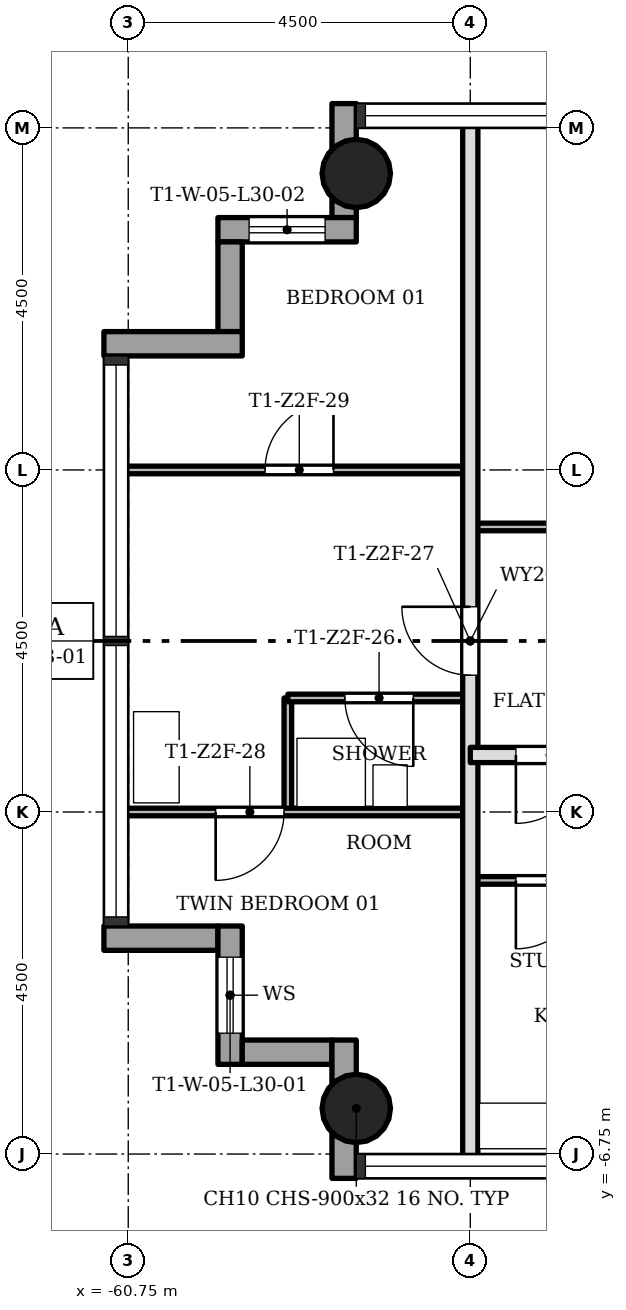
"""IFC4 building model, lengths in metres.
Left out: names, types, materials, properties, quantities, classifications, styles, units other than length and angle.
Written with IfcOpenShell. Run it as: python <this file> out.ifc"""

import sys

from ifc_helpers import new_model, si_unit, direction, frame, frame_2d, origin, origin_2d, place, context, subcontext, project, spatial, rectangle, hollow_circle, extrude, element, fill, save


model = new_model("IFC4")
c1 = context("Model", 3, precision=1e-05, world=origin(), true_north=direction((0.0, 1.0)))
c2 = subcontext(c1, "Body", "Model", "MODEL_VIEW")
j1 = project(units=[si_unit("LENGTHUNIT", "METRE"), si_unit("PLANEANGLEUNIT", "RADIAN")], contexts=[c1])
p1 = place(None, origin())
s1 = spatial("IfcSite", under=j1, at=p1, CompositionType="ELEMENT")
p2 = place(p1, origin())
s2 = spatial("IfcBuilding", under=s1, at=p2, CompositionType="ELEMENT")
p3 = place(p2, frame((0.0, 0.0, 110.6)))
s3 = spatial("IfcBuildingStorey", under=s2, at=p3, CompositionType="ELEMENT", Elevation=110.6)
for number, where, z_axis, x_axis in (
    (1, (-57.75, -6.15, 0.0), (0.0, 0.0, 1.0), (1.0, 0.0, 0.0)),
    (2, (-57.75, 6.15, 0.0), (0.0, 0.0, 1.0), (1.0, 0.0, 0.0)),
):
    element("IfcColumn", number, at=place(p3, frame(where, z_axis=z_axis, x_axis=x_axis)), inside=s3, PredefinedType="COLUMN", context=c2, shape_type="SweptSolid", body=[
        extrude(hollow_circle(Radius=0.45, WallThickness=0.032, at=origin_2d()), origin(), (0.0, 0.0, 1.0), 3.4),
    ])
p4 = place(p3, frame((-61.07, -3.91, -0.3), z_axis=(0.0, 0.0, 1.0), x_axis=(1.0, 0.0, 0.0)))
e3 = element("IfcWall", 3, at=p4, inside=s3, PredefinedType="STANDARD", context=c2, shape_type="SweptSolid", body=[
    extrude(rectangle(XDim=1.5, YDim=0.32, at=frame_2d((0.75, 0.0))), origin(), (0.0, 0.0, 1.0), 3.4),
])
p5 = place(p3, frame((-59.41, -3.75, -0.3), z_axis=(0.0, 0.0, 1.0), x_axis=(0.0, -1.0, 0.0)))
e4 = element("IfcWall", 4, at=p5, inside=s3, PredefinedType="STANDARD", context=c2, shape_type="SweptSolid", body=[
    extrude(rectangle(XDim=1.82, YDim=0.32, at=frame_2d((0.91, 0.0))), origin(), (0.0, 0.0, 1.0), 3.4),
])
p6 = place(p5, frame((0.41, 0.0, 1.2)))
e5 = element("IfcOpeningElement", 5, at=p6, cuts=e4, PredefinedType="OPENING", context=c2, shape_type="SweptSolid", body=[
    extrude(rectangle(XDim=1.0, YDim=1.5, at=frame_2d((0.5, 0.75))), frame((0.0, 0.17, 0.0), z_axis=(0.0, -1.0, 0.0), x_axis=(1.0, 0.0, 0.0)), (0.0, 0.0, 1.0), 0.34),
])
p7 = place(p3, frame((-59.25, -5.41, -0.3), z_axis=(0.0, 0.0, 1.0), x_axis=(1.0, 0.0, 0.0)))
e6 = element("IfcWall", 6, at=p7, inside=s3, PredefinedType="STANDARD", context=c2, shape_type="SweptSolid", body=[
    extrude(rectangle(XDim=1.18, YDim=0.32, at=frame_2d((0.59, 0.0))), origin(), (0.0, 0.0, 1.0), 3.4),
])
p8 = place(p3, frame((-57.91, -5.25, -0.3), z_axis=(0.0, 0.0, 1.0), x_axis=(0.0, -1.0, 0.0)))
e7 = element("IfcWall", 7, at=p8, inside=s3, PredefinedType="STANDARD", context=c2, shape_type="SweptSolid", body=[
    extrude(rectangle(XDim=1.82, YDim=0.32, at=frame_2d((0.91, 0.0))), origin(), (0.0, 0.0, 1.0), 3.4),
])
p9 = place(p3, frame((-57.91, 7.07, -0.3), z_axis=(0.0, 0.0, 1.0), x_axis=(0.0, -1.0, 0.0)))
e8 = element("IfcWall", 8, at=p9, inside=s3, PredefinedType="STANDARD", context=c2, shape_type="SweptSolid", body=[
    extrude(rectangle(XDim=1.5, YDim=0.32, at=frame_2d((0.75, 0.0))), origin(), (0.0, 0.0, 1.0), 3.4),
])
p10 = place(p3, frame((-57.75, 5.41, -0.3), z_axis=(0.0, 0.0, 1.0), x_axis=(-1.0, 0.0, 0.0)))
e9 = element("IfcWall", 9, at=p10, inside=s3, PredefinedType="STANDARD", context=c2, shape_type="SweptSolid", body=[
    extrude(rectangle(XDim=1.82, YDim=0.32, at=frame_2d((0.91, 0.0))), origin(), (0.0, 0.0, 1.0), 3.4),
])
p11 = place(p10, frame((0.41, 0.0, 1.2)))
e10 = element("IfcOpeningElement", 10, at=p11, cuts=e9, PredefinedType="OPENING", context=c2, shape_type="SweptSolid", body=[
    extrude(rectangle(XDim=1.0, YDim=1.5, at=frame_2d((0.5, 0.75))), frame((0.0, 0.17, 0.0), z_axis=(0.0, -1.0, 0.0), x_axis=(1.0, 0.0, 0.0)), (0.0, 0.0, 1.0), 0.34),
])
p12 = place(p3, frame((-59.41, 5.25, -0.3), z_axis=(0.0, 0.0, 1.0), x_axis=(0.0, -1.0, 0.0)))
e11 = element("IfcWall", 11, at=p12, inside=s3, PredefinedType="STANDARD", context=c2, shape_type="SweptSolid", body=[
    extrude(rectangle(XDim=1.18, YDim=0.32, at=frame_2d((0.59, 0.0))), origin(), (0.0, 0.0, 1.0), 3.4),
])
p13 = place(p3, frame((-59.25, 3.91, -0.3), z_axis=(0.0, 0.0, 1.0), x_axis=(-1.0, 0.0, 0.0)))
e12 = element("IfcWall", 12, at=p13, inside=s3, PredefinedType="STANDARD", context=c2, shape_type="SweptSolid", body=[
    extrude(rectangle(XDim=1.82, YDim=0.32, at=frame_2d((0.91, 0.0))), origin(), (0.0, 0.0, 1.0), 3.4),
])
p14 = place(p3, frame((-58.65, -2.25, 0.0), z_axis=(0.0, 0.0, 1.0), x_axis=(0.0, 1.0, 0.0)))
e13 = element("IfcWall", 13, at=p14, inside=s3, PredefinedType="PARTITIONING", context=c2, shape_type="SweptSolid", body=[
    extrude(rectangle(XDim=1.5, YDim=0.1, at=frame_2d((0.75, 0.0))), origin(), (0.0, 0.0, 1.0), 3.0),
])
p15 = place(p3, frame((-56.25, -6.85, 0.0), z_axis=(0.0, 0.0, 1.0), x_axis=(0.0, 1.0, 0.0)))
e14 = element("IfcWall", 14, at=p15, inside=s3, PredefinedType="SOLIDWALL", context=c2, shape_type="SweptSolid", body=[
    extrude(rectangle(XDim=13.7, YDim=0.2, at=frame_2d((6.85, 0.0))), origin(), (0.0, 0.0, 1.0), 3.0),
])
p16 = place(p15, frame((6.4, 0.0, 0.0)))
e15 = element("IfcOpeningElement", 15, at=p16, cuts=e14, PredefinedType="OPENING", context=c2, shape_type="SweptSolid", body=[
    extrude(rectangle(XDim=0.9, YDim=2.1, at=frame_2d((0.45, 1.05))), frame((0.0, 0.11, 0.0), z_axis=(0.0, -1.0, 0.0), x_axis=(1.0, 0.0, 0.0)), (0.0, 0.0, 1.0), 0.22),
])
p17 = place(p3, frame((-56.25, -3.15, 0.0), z_axis=(0.0, 0.0, 1.0), x_axis=(1.0, 0.0, 0.0)))
e16 = element("IfcWall", 16, at=p17, inside=s3, PredefinedType="PARTITIONING", context=c2, shape_type="SweptSolid", body=[
    extrude(rectangle(XDim=4.5, YDim=0.1, at=frame_2d((2.25, 0.0))), origin(), (0.0, 0.0, 1.0), 3.0),
])
p18 = place(p17, frame((0.6, 0.0, 0.0)))
e17 = element("IfcOpeningElement", 17, at=p18, cuts=e16, PredefinedType="OPENING", context=c2, shape_type="SweptSolid", body=[
    extrude(rectangle(XDim=0.9, YDim=2.1, at=frame_2d((0.45, 1.05))), frame((0.0, 0.06, 0.0), z_axis=(0.0, -1.0, 0.0), x_axis=(1.0, 0.0, 0.0)), (0.0, 0.0, 1.0), 0.12),
])
p19 = place(p3, frame((-60.85, -2.25, 0.0), z_axis=(0.0, 0.0, 1.0), x_axis=(1.0, 0.0, 0.0)))
e18 = element("IfcWall", 18, at=p19, inside=s3, PredefinedType="PARTITIONING", context=c2, shape_type="SweptSolid", body=[
    extrude(rectangle(XDim=4.6, YDim=0.1, at=frame_2d((2.3, 0.0))), origin(), (0.0, 0.0, 1.0), 3.0),
])
p20 = place(p19, frame((1.25, 0.0, 0.0)))
e19 = element("IfcOpeningElement", 19, at=p20, cuts=e18, PredefinedType="OPENING", context=c2, shape_type="SweptSolid", body=[
    extrude(rectangle(XDim=0.9, YDim=2.1, at=frame_2d((0.45, 1.05))), frame((0.0, 0.06, 0.0), z_axis=(0.0, -1.0, 0.0), x_axis=(1.0, 0.0, 0.0)), (0.0, 0.0, 1.0), 0.12),
])
p21 = place(p3, frame((-56.25, -1.5, 0.0), z_axis=(0.0, 0.0, 1.0), x_axis=(1.0, 0.0, 0.0)))
e20 = element("IfcWall", 20, at=p21, inside=s3, PredefinedType="SOLIDWALL", context=c2, shape_type="SweptSolid", body=[
    extrude(rectangle(XDim=4.5, YDim=0.2, at=frame_2d((2.25, 0.0))), origin(), (0.0, 0.0, 1.0), 3.0),
])
p22 = place(p21, frame((0.6, 0.0, 0.0)))
e21 = element("IfcOpeningElement", 21, at=p22, cuts=e20, PredefinedType="OPENING", context=c2, shape_type="SweptSolid", body=[
    extrude(rectangle(XDim=0.9, YDim=2.1, at=frame_2d((0.45, 1.05))), frame((0.0, 0.11, 0.0), z_axis=(0.0, -1.0, 0.0), x_axis=(1.0, 0.0, 0.0)), (0.0, 0.0, 1.0), 0.22),
])
p23 = place(p3, frame((-58.65, -0.75, 0.0), z_axis=(0.0, 0.0, 1.0), x_axis=(1.0, 0.0, 0.0)))
e22 = element("IfcWall", 22, at=p23, inside=s3, PredefinedType="PARTITIONING", context=c2, shape_type="SweptSolid", body=[
    extrude(rectangle(XDim=2.4, YDim=0.1, at=frame_2d((1.2, 0.0))), origin(), (0.0, 0.0, 1.0), 3.0),
])
p24 = place(p23, frame((0.75, 0.0, 0.0)))
e23 = element("IfcOpeningElement", 23, at=p24, cuts=e22, PredefinedType="OPENING", context=c2, shape_type="SweptSolid", body=[
    extrude(rectangle(XDim=0.9, YDim=2.1, at=frame_2d((0.45, 1.05))), frame((0.0, 0.06, 0.0), z_axis=(0.0, -1.0, 0.0), x_axis=(1.0, 0.0, 0.0)), (0.0, 0.0, 1.0), 0.12),
])
p25 = place(p3, frame((-56.25, 1.5, 0.0), z_axis=(0.0, 0.0, 1.0), x_axis=(1.0, 0.0, 0.0)))
e24 = element("IfcWall", 24, at=p25, inside=s3, PredefinedType="PARTITIONING", context=c2, shape_type="SweptSolid", body=[
    extrude(rectangle(XDim=4.5, YDim=0.1, at=frame_2d((2.25, 0.0))), origin(), (0.0, 0.0, 1.0), 3.0),
])
p26 = place(p25, frame((1.8, 0.0, 0.0)))
e25 = element("IfcOpeningElement", 25, at=p26, cuts=e24, PredefinedType="OPENING", context=c2, shape_type="SweptSolid", body=[
    extrude(rectangle(XDim=0.9, YDim=2.1, at=frame_2d((0.45, 1.05))), frame((0.0, 0.06, 0.0), z_axis=(0.0, -1.0, 0.0), x_axis=(1.0, 0.0, 0.0)), (0.0, 0.0, 1.0), 0.12),
])
p27 = place(p3, frame((-60.85, 2.25, 0.0), z_axis=(0.0, 0.0, 1.0), x_axis=(1.0, 0.0, 0.0)))
e26 = element("IfcWall", 26, at=p27, inside=s3, PredefinedType="PARTITIONING", context=c2, shape_type="SweptSolid", body=[
    extrude(rectangle(XDim=4.6, YDim=0.1, at=frame_2d((2.3, 0.0))), origin(), (0.0, 0.0, 1.0), 3.0),
])
p28 = place(p27, frame((1.9, 0.0, 0.0)))
e27 = element("IfcOpeningElement", 27, at=p28, cuts=e26, PredefinedType="OPENING", context=c2, shape_type="SweptSolid", body=[
    extrude(rectangle(XDim=0.9, YDim=2.1, at=frame_2d((0.45, 1.05))), frame((0.0, 0.06, 0.0), z_axis=(0.0, -1.0, 0.0), x_axis=(1.0, 0.0, 0.0)), (0.0, 0.0, 1.0), 0.12),
])
p29 = place(p22, origin())
e28 = element("IfcDoor", 28, at=p29, inside=s3, OperationType="SINGLE_SWING_LEFT", PredefinedType="DOOR", context=c2, shape_type="SweptSolid", body=[
    extrude(rectangle(XDim=0.9, YDim=2.1, at=frame_2d((0.45, 1.05))), frame((0.0, 0.025, 0.0), z_axis=(0.0, -1.0, 0.0), x_axis=(1.0, 0.0, 0.0)), (0.0, 0.0, 1.0), 0.05),
])
fill(e21, e28)
p30 = place(p18, origin())
e29 = element("IfcDoor", 29, at=p30, inside=s3, OperationType="SINGLE_SWING_LEFT", PredefinedType="DOOR", context=c2, shape_type="SweptSolid", body=[
    extrude(rectangle(XDim=0.9, YDim=2.1, at=frame_2d((0.45, 1.05))), frame((0.0, 0.025, 0.0), z_axis=(0.0, -1.0, 0.0), x_axis=(1.0, 0.0, 0.0)), (0.0, 0.0, 1.0), 0.05),
])
fill(e17, e29)
p31 = place(p24, origin())
e30 = element("IfcDoor", 30, at=p31, inside=s3, OperationType="SINGLE_SWING_RIGHT", PredefinedType="DOOR", context=c2, shape_type="SweptSolid", body=[
    extrude(rectangle(XDim=0.9, YDim=2.1, at=frame_2d((0.45, 1.05))), frame((0.0, 0.025, 0.0), z_axis=(0.0, -1.0, 0.0), x_axis=(1.0, 0.0, 0.0)), (0.0, 0.0, 1.0), 0.05),
])
fill(e23, e30)
p32 = place(p16, origin())
e31 = element("IfcDoor", 31, at=p32, inside=s3, OperationType="SINGLE_SWING_LEFT", PredefinedType="DOOR", context=c2, shape_type="SweptSolid", body=[
    extrude(rectangle(XDim=0.9, YDim=2.1, at=frame_2d((0.45, 1.05))), frame((0.0, 0.025, 0.0), z_axis=(0.0, -1.0, 0.0), x_axis=(1.0, 0.0, 0.0)), (0.0, 0.0, 1.0), 0.05),
])
fill(e15, e31)
p33 = place(p20, origin())
e32 = element("IfcDoor", 32, at=p33, inside=s3, OperationType="SINGLE_SWING_LEFT", PredefinedType="DOOR", context=c2, shape_type="SweptSolid", body=[
    extrude(rectangle(XDim=0.9, YDim=2.1, at=frame_2d((0.45, 1.05))), frame((0.0, 0.025, 0.0), z_axis=(0.0, -1.0, 0.0), x_axis=(1.0, 0.0, 0.0)), (0.0, 0.0, 1.0), 0.05),
])
fill(e19, e32)
p34 = place(p28, origin())
e33 = element("IfcDoor", 33, at=p34, inside=s3, OperationType="SINGLE_SWING_LEFT", PredefinedType="DOOR", context=c2, shape_type="SweptSolid", body=[
    extrude(rectangle(XDim=0.9, YDim=2.1, at=frame_2d((0.45, 1.05))), frame((0.0, 0.025, 0.0), z_axis=(0.0, -1.0, 0.0), x_axis=(1.0, 0.0, 0.0)), (0.0, 0.0, 1.0), 0.05),
])
fill(e27, e33)
p35 = place(p6, origin())
e34 = element("IfcWindow", 34, at=p35, inside=s3, PartitioningType="SINGLE_PANEL", PredefinedType="WINDOW", context=c2, shape_type="SweptSolid", body=[
    extrude(rectangle(XDim=1.0, YDim=1.5, at=frame_2d((0.5, 0.75))), frame((0.0, 0.03, 0.0), z_axis=(0.0, -1.0, 0.0), x_axis=(1.0, 0.0, 0.0)), (0.0, 0.0, 1.0), 0.06),
])
fill(e5, e34)
p36 = place(p11, origin())
e35 = element("IfcWindow", 35, at=p36, inside=s3, PartitioningType="SINGLE_PANEL", PredefinedType="WINDOW", context=c2, shape_type="SweptSolid", body=[
    extrude(rectangle(XDim=1.0, YDim=1.5, at=frame_2d((0.5, 0.75))), frame((0.0, 0.03, 0.0), z_axis=(0.0, -1.0, 0.0), x_axis=(1.0, 0.0, 0.0)), (0.0, 0.0, 1.0), 0.06),
])
fill(e10, e35)
save(model, sys.argv[1])
